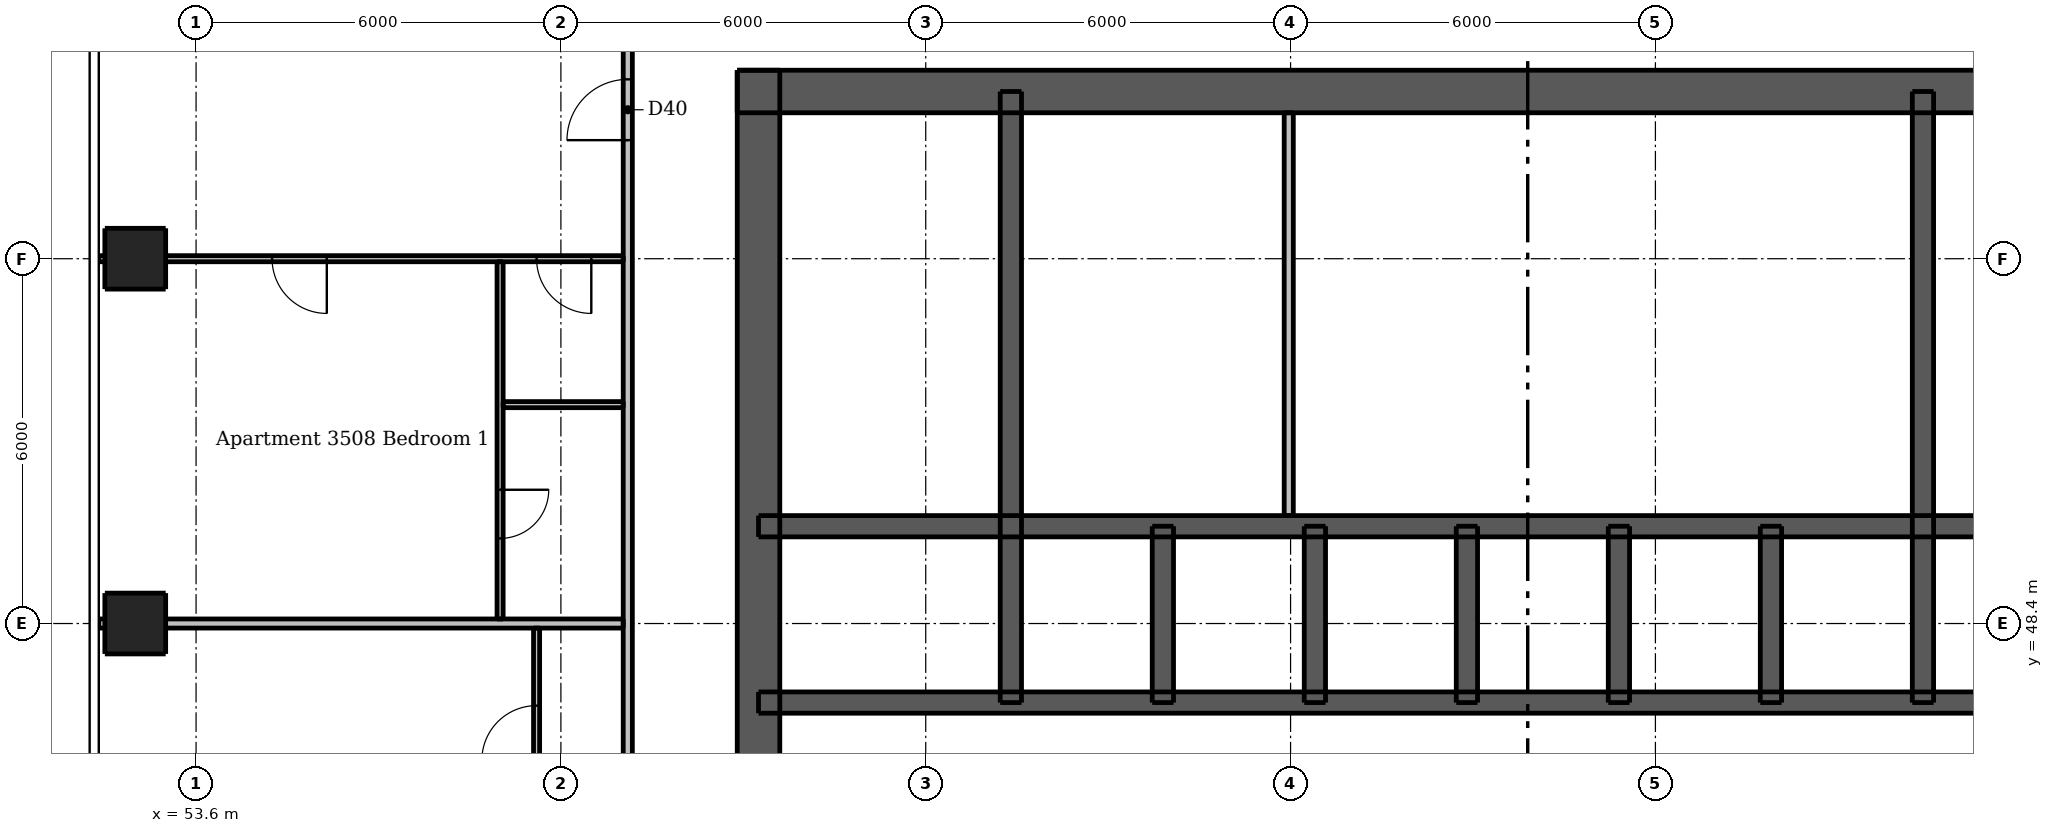
"""IFC4 building model, lengths in metres.
Left out: names, types, materials, properties, quantities, classifications, styles, units other than length and angle.
Written with IfcOpenShell. Run it as: python <this file> out.ifc"""

import sys

from ifc_helpers import new_model, si_unit, direction, frame, frame_2d, origin, origin_2d, place, context, subcontext, project, spatial, rectangle, extrude, element, fill, save


model = new_model("IFC4")
c1 = context("Model", 3, precision=1e-05, world=origin(), true_north=direction((0.0, 1.0)))
c2 = subcontext(c1, "Body", "Model", "MODEL_VIEW")
j1 = project(units=[si_unit("LENGTHUNIT", "METRE"), si_unit("PLANEANGLEUNIT", "RADIAN")], contexts=[c1])
p1 = place(None, origin())
s1 = spatial("IfcSite", under=j1, at=p1, CompositionType="ELEMENT")
p2 = place(p1, origin())
s2 = spatial("IfcBuilding", under=s1, at=p2, CompositionType="ELEMENT")
p3 = place(p2, frame((0.0, 0.0, 133.9)))
s3 = spatial("IfcBuildingStorey", under=s2, at=p3, CompositionType="ELEMENT", Elevation=133.9)
p4 = place(p3, frame((62.5, 57.15, 0.0), z_axis=(0.0, 0.0, 1.0), x_axis=(1.0, 0.0, 0.0)))
e1 = element("IfcWall", 1, at=p4, inside=s3, PredefinedType="SHEAR", context=c2, shape_type="SweptSolid", body=[
    extrude(rectangle(XDim=24.0, YDim=0.7, at=frame_2d((12.0, 0.0))), origin(), (0.0, 0.0, 1.0), 3.05),
])
p5 = place(p4, frame((20.938, 0.0, 0.0)))
e2 = element("IfcOpeningElement", 2, at=p5, cuts=e1, PredefinedType="OPENING", context=c2, shape_type="SweptSolid", body=[
    extrude(rectangle(XDim=1.1, YDim=2.1, at=frame_2d((0.55, 1.05))), frame((0.0, 0.36, 0.0), z_axis=(0.0, -1.0, 0.0), x_axis=(1.0, 0.0, 0.0)), (0.0, 0.0, 1.0), 0.72),
])
p6 = place(p4, frame((1.962, 0.0, 0.0)))
e3 = element("IfcOpeningElement", 3, at=p6, cuts=e1, PredefinedType="OPENING", context=c2, shape_type="SweptSolid", body=[
    extrude(rectangle(XDim=1.1, YDim=2.1, at=frame_2d((0.55, 1.05))), frame((0.0, 0.36, 0.0), z_axis=(0.0, -1.0, 0.0), x_axis=(1.0, 0.0, 0.0)), (0.0, 0.0, 1.0), 0.72),
])
p7 = place(p4, frame((6.423, 0.0, 0.0)))
e4 = element("IfcOpeningElement", 4, at=p7, cuts=e1, PredefinedType="OPENING", context=c2, shape_type="SweptSolid", body=[
    extrude(rectangle(XDim=0.9, YDim=2.1, at=frame_2d((0.45, 1.05))), frame((0.0, 0.36, 0.0), z_axis=(0.0, -1.0, 0.0), x_axis=(1.0, 0.0, 0.0)), (0.0, 0.0, 1.0), 0.72),
])
p8 = place(p4, frame((13.748, 0.0, 0.0)))
e5 = element("IfcOpeningElement", 5, at=p8, cuts=e1, PredefinedType="OPENING", context=c2, shape_type="SweptSolid", body=[
    extrude(rectangle(XDim=0.9, YDim=2.1, at=frame_2d((0.45, 1.05))), frame((0.0, 0.36, 0.0), z_axis=(0.0, -1.0, 0.0), x_axis=(1.0, 0.0, 0.0)), (0.0, 0.0, 1.0), 0.72),
])
p9 = place(p3, frame((62.85, 33.5, 0.0), z_axis=(0.0, 0.0, 1.0), x_axis=(0.0, 1.0, 0.0)))
e6 = element("IfcWall", 6, at=p9, inside=s3, PredefinedType="SHEAR", context=c2, shape_type="SweptSolid", body=[
    extrude(rectangle(XDim=24.0, YDim=0.7, at=frame_2d((12.0, 0.0))), origin(), (0.0, 0.0, 1.0), 3.05),
])
p10 = place(p9, frame((11.2, 0.0, 0.0)))
e7 = element("IfcOpeningElement", 7, at=p10, cuts=e6, PredefinedType="OPENING", context=c2, shape_type="SweptSolid", body=[
    extrude(rectangle(XDim=1.6, YDim=2.1, at=frame_2d((0.8, 1.05))), frame((0.0, 0.36, 0.0), z_axis=(0.0, -1.0, 0.0), x_axis=(1.0, 0.0, 0.0)), (0.0, 0.0, 1.0), 0.72),
])
p11 = place(p3, frame((62.85, 47.1, 0.0), z_axis=(0.0, 0.0, 1.0), x_axis=(1.0, 0.0, 0.0)))
e8 = element("IfcWall", 8, at=p11, inside=s3, PredefinedType="SHEAR", context=c2, shape_type="SweptSolid", body=[
    extrude(rectangle(XDim=23.3, YDim=0.35, at=frame_2d((11.65, 0.0))), origin(), (0.0, 0.0, 1.0), 3.05),
])
p12 = place(p11, frame((1.712, 0.0, 0.0)))
e9 = element("IfcOpeningElement", 9, at=p12, cuts=e8, PredefinedType="OPENING", context=c2, shape_type="SweptSolid", body=[
    extrude(rectangle(XDim=0.9, YDim=2.1, at=frame_2d((0.45, 1.05))), frame((0.0, 0.185, 0.0), z_axis=(0.0, -1.0, 0.0), x_axis=(1.0, 0.0, 0.0)), (0.0, 0.0, 1.0), 0.37),
])
p13 = place(p11, frame((20.688, 0.0, 0.0)))
e10 = element("IfcOpeningElement", 10, at=p13, cuts=e8, PredefinedType="OPENING", context=c2, shape_type="SweptSolid", body=[
    extrude(rectangle(XDim=0.9, YDim=2.1, at=frame_2d((0.45, 1.05))), frame((0.0, 0.185, 0.0), z_axis=(0.0, -1.0, 0.0), x_axis=(1.0, 0.0, 0.0)), (0.0, 0.0, 1.0), 0.37),
])
p14 = place(p3, frame((62.85, 50.0, 0.0), z_axis=(0.0, 0.0, 1.0), x_axis=(1.0, 0.0, 0.0)))
e11 = element("IfcWall", 11, at=p14, inside=s3, PredefinedType="SHEAR", context=c2, shape_type="SweptSolid", body=[
    extrude(rectangle(XDim=23.3, YDim=0.35, at=frame_2d((11.65, 0.0))), origin(), (0.0, 0.0, 1.0), 3.05),
])
for number, where, z_axis, x_axis in (
    (12, (67.0, 47.1, 0.0), (0.0, 0.0, 1.0), (0.0, 1.0, 0.0)),
    (13, (82.0, 47.1, 0.0), (0.0, 0.0, 1.0), (0.0, 1.0, 0.0)),
):
    element("IfcWall", number, at=place(p3, frame(where, z_axis=z_axis, x_axis=x_axis)), inside=s3, PredefinedType="SHEAR", context=c2, shape_type="SweptSolid", body=[
        extrude(rectangle(XDim=10.05, YDim=0.35, at=frame_2d((5.025, 0.0))), origin(), (0.0, 0.0, 1.0), 3.05),
    ])
for number, where, z_axis, x_axis in (
    (14, (69.5, 47.1, 0.0), (0.0, 0.0, 1.0), (0.0, 1.0, 0.0)),
    (15, (72.0, 47.1, 0.0), (0.0, 0.0, 1.0), (0.0, 1.0, 0.0)),
    (16, (74.5, 47.1, 0.0), (0.0, 0.0, 1.0), (0.0, 1.0, 0.0)),
    (17, (77.0, 47.1, 0.0), (0.0, 0.0, 1.0), (0.0, 1.0, 0.0)),
    (18, (79.5, 47.1, 0.0), (0.0, 0.0, 1.0), (0.0, 1.0, 0.0)),
):
    element("IfcWall", number, at=place(p3, frame(where, z_axis=z_axis, x_axis=x_axis)), inside=s3, PredefinedType="SHEAR", context=c2, shape_type="SweptSolid", body=[
        extrude(rectangle(XDim=2.9, YDim=0.35, at=frame_2d((1.45, 0.0))), origin(), (0.0, 0.0, 1.0), 3.05),
    ])
for number, where, z_axis, x_axis in (
    (19, (52.6, 48.4, 0.0), (0.0, 0.0, 1.0), (1.0, 0.0, 0.0)),
    (20, (52.6, 54.4, 0.0), (0.0, 0.0, 1.0), (1.0, 0.0, 0.0)),
):
    element("IfcColumn", number, at=place(p3, frame(where, z_axis=z_axis, x_axis=x_axis)), inside=s3, PredefinedType="COLUMN", context=c2, shape_type="SweptSolid", body=[
        extrude(rectangle(XDim=1.0, YDim=1.0, at=origin_2d()), origin(), (0.0, 0.0, 1.0), 3.05),
    ])
p15 = place(p3, frame((71.57, 50.175, 0.0), z_axis=(0.0, 0.0, 1.0), x_axis=(0.0, 1.0, 0.0)))
e21 = element("IfcWall", 21, at=p15, inside=s3, PredefinedType="PLUMBINGWALL", context=c2, shape_type="SweptSolid", body=[
    extrude(rectangle(XDim=6.625, YDim=0.15, at=frame_2d((3.312, 0.0))), origin(), (0.0, 0.0, 1.0), 3.05),
])
p16 = place(p3, frame((58.6, 54.35, 0.0), z_axis=(0.0, 0.0, 1.0), x_axis=(0.0, -1.0, 0.0)))
e22 = element("IfcWall", 22, at=p16, inside=s3, PredefinedType="PARTITIONING", context=c2, shape_type="SweptSolid", body=[
    extrude(rectangle(XDim=5.875, YDim=0.1, at=frame_2d((2.938, 0.0))), origin(), (0.0, 0.0, 1.0), 3.05),
])
p17 = place(p16, frame((3.75, 0.0, 0.0)))
e23 = element("IfcOpeningElement", 23, at=p17, cuts=e22, PredefinedType="OPENING", context=c2, shape_type="SweptSolid", body=[
    extrude(rectangle(XDim=0.8, YDim=2.1, at=frame_2d((0.4, 1.05))), frame((0.0, 0.06, 0.0), z_axis=(0.0, -1.0, 0.0), x_axis=(1.0, 0.0, 0.0)), (0.0, 0.0, 1.0), 0.12),
])
p18 = place(p3, frame((59.2, 31.65, 0.0), z_axis=(0.0, 0.0, 1.0), x_axis=(0.0, 1.0, 0.0)))
e24 = element("IfcWall", 24, at=p18, inside=s3, PredefinedType="PARTITIONING", context=c2, shape_type="SweptSolid", body=[
    extrude(rectangle(XDim=16.675, YDim=0.1, at=frame_2d((8.337, 0.0))), origin(), (0.0, 0.0, 1.0), 3.05),
])
p19 = place(p18, frame((0.75, 0.0, 0.0)))
e25 = element("IfcOpeningElement", 25, at=p19, cuts=e24, PredefinedType="OPENING", context=c2, shape_type="SweptSolid", body=[
    extrude(rectangle(XDim=0.9, YDim=2.1, at=frame_2d((0.45, 1.05))), frame((0.0, 0.06, 0.0), z_axis=(0.0, -1.0, 0.0), x_axis=(1.0, 0.0, 0.0)), (0.0, 0.0, 1.0), 0.12),
])
p20 = place(p18, frame((3.1, 0.0, 0.0)))
e26 = element("IfcOpeningElement", 26, at=p20, cuts=e24, PredefinedType="OPENING", context=c2, shape_type="SweptSolid", body=[
    extrude(rectangle(XDim=0.9, YDim=2.1, at=frame_2d((0.45, 1.05))), frame((0.0, 0.06, 0.0), z_axis=(0.0, -1.0, 0.0), x_axis=(1.0, 0.0, 0.0)), (0.0, 0.0, 1.0), 0.12),
])
p21 = place(p18, frame((8.5, 0.0, 0.0)))
e27 = element("IfcOpeningElement", 27, at=p21, cuts=e24, PredefinedType="OPENING", context=c2, shape_type="SweptSolid", body=[
    extrude(rectangle(XDim=0.9, YDim=2.1, at=frame_2d((0.45, 1.05))), frame((0.0, 0.06, 0.0), z_axis=(0.0, -1.0, 0.0), x_axis=(1.0, 0.0, 0.0)), (0.0, 0.0, 1.0), 0.12),
])
p22 = place(p18, frame((14.5, 0.0, 0.0)))
e28 = element("IfcOpeningElement", 28, at=p22, cuts=e24, PredefinedType="OPENING", context=c2, shape_type="SweptSolid", body=[
    extrude(rectangle(XDim=0.9, YDim=2.1, at=frame_2d((0.45, 1.05))), frame((0.0, 0.06, 0.0), z_axis=(0.0, -1.0, 0.0), x_axis=(1.0, 0.0, 0.0)), (0.0, 0.0, 1.0), 0.12),
])
p23 = place(p18, frame((5.55, 0.0, 0.0)))
e29 = element("IfcOpeningElement", 29, at=p23, cuts=e24, PredefinedType="OPENING", context=c2, shape_type="SweptSolid", body=[
    extrude(rectangle(XDim=0.8, YDim=2.1, at=frame_2d((0.4, 1.05))), frame((0.0, 0.06, 0.0), z_axis=(0.0, -1.0, 0.0), x_axis=(1.0, 0.0, 0.0)), (0.0, 0.0, 1.0), 0.12),
])
p24 = place(p18, frame((11.55, 0.0, 0.0)))
e30 = element("IfcOpeningElement", 30, at=p24, cuts=e24, PredefinedType="OPENING", context=c2, shape_type="SweptSolid", body=[
    extrude(rectangle(XDim=0.8, YDim=2.1, at=frame_2d((0.4, 1.05))), frame((0.0, 0.06, 0.0), z_axis=(0.0, -1.0, 0.0), x_axis=(1.0, 0.0, 0.0)), (0.0, 0.0, 1.0), 0.12),
])
p25 = place(p3, frame((60.625, 54.4, 0.0), z_axis=(0.0, 0.0, 1.0), x_axis=(-1.0, 0.0, 0.0)))
e31 = element("IfcWall", 31, at=p25, inside=s3, PredefinedType="PARTITIONING", context=c2, shape_type="SweptSolid", body=[
    extrude(rectangle(XDim=8.625, YDim=0.1, at=frame_2d((4.312, 0.0))), origin(), (0.0, 0.0, 1.0), 2.516),
])
p26 = place(p25, frame((0.525, 0.0, 0.0)))
e32 = element("IfcOpeningElement", 32, at=p26, cuts=e31, PredefinedType="OPENING", context=c2, shape_type="SweptSolid", body=[
    extrude(rectangle(XDim=0.9, YDim=2.1, at=frame_2d((0.45, 1.05))), frame((0.0, 0.06, 0.0), z_axis=(0.0, -1.0, 0.0), x_axis=(1.0, 0.0, 0.0)), (0.0, 0.0, 1.0), 0.12),
])
p27 = place(p25, frame((4.875, 0.0, 0.0)))
e33 = element("IfcOpeningElement", 33, at=p27, cuts=e31, PredefinedType="OPENING", context=c2, shape_type="SweptSolid", body=[
    extrude(rectangle(XDim=0.9, YDim=2.1, at=frame_2d((0.45, 1.05))), frame((0.0, 0.06, 0.0), z_axis=(0.0, -1.0, 0.0), x_axis=(1.0, 0.0, 0.0)), (0.0, 0.0, 1.0), 0.12),
])
p28 = place(p3, frame((58.65, 52.0, 0.0), z_axis=(0.0, 0.0, 1.0), x_axis=(1.0, 0.0, 0.0)))
e34 = element("IfcWall", 34, at=p28, inside=s3, PredefinedType="PARTITIONING", context=c2, shape_type="SweptSolid", body=[
    extrude(rectangle(XDim=1.975, YDim=0.1, at=frame_2d((0.988, 0.0))), origin(), (0.0, 0.0, 1.0), 3.05),
])
p29 = place(p3, frame((60.7, 30.325, 0.0), z_axis=(0.0, 0.0, 1.0), x_axis=(0.0, 1.0, 0.0)))
e35 = element("IfcWall", 35, at=p29, inside=s3, PredefinedType="PARTITIONING", context=c2, shape_type="SweptSolid", body=[
    extrude(rectangle(XDim=28.9, YDim=0.15, at=frame_2d((14.45, 0.0))), origin(), (0.0, 0.0, 1.0), 3.05),
])
p30 = place(p29, frame((9.225, 0.0, 0.0)))
e36 = element("IfcOpeningElement", 36, at=p30, cuts=e35, PredefinedType="OPENING", context=c2, shape_type="SweptSolid", body=[
    extrude(rectangle(XDim=1.0, YDim=2.1, at=frame_2d((0.5, 1.05))), frame((0.0, 0.085, 0.0), z_axis=(0.0, -1.0, 0.0), x_axis=(1.0, 0.0, 0.0)), (0.0, 0.0, 1.0), 0.17),
])
p31 = place(p29, frame((26.025, 0.0, 0.0)))
e37 = element("IfcOpeningElement", 37, at=p31, cuts=e35, PredefinedType="OPENING", context=c2, shape_type="SweptSolid", body=[
    extrude(rectangle(XDim=1.0, YDim=2.1, at=frame_2d((0.5, 1.05))), frame((0.0, 0.085, 0.0), z_axis=(0.0, -1.0, 0.0), x_axis=(1.0, 0.0, 0.0)), (0.0, 0.0, 1.0), 0.17),
])
p32 = place(p3, frame((52.0, 48.4, 0.0), z_axis=(0.0, 0.0, 1.0), x_axis=(1.0, 0.0, 0.0)))
e38 = element("IfcWall", 38, at=p32, inside=s3, PredefinedType="PARTITIONING", context=c2, shape_type="SweptSolid", body=[
    extrude(rectangle(XDim=8.625, YDim=0.15, at=frame_2d((4.312, 0.0))), origin(), (0.0, 0.0, 1.0), 2.516),
])
p33 = place(p6, origin())
e39 = element("IfcDoor", 39, at=p33, inside=s3, OperationType="SINGLE_SWING_LEFT", PredefinedType="DOOR", context=c2, shape_type="SweptSolid", body=[
    extrude(rectangle(XDim=1.1, YDim=2.1, at=frame_2d((0.55, 1.05))), frame((0.0, -0.288, 0.0), z_axis=(0.0, -1.0, 0.0), x_axis=(1.0, 0.0, 0.0)), (0.0, 0.0, 1.0), 0.05),
])
fill(e3, e39)
p34 = place(p10, origin())
e40 = element("IfcDoor", 40, at=p34, inside=s3, OperationType="DOUBLE_DOOR_SINGLE_SWING", PredefinedType="DOOR", context=c2, shape_type="SweptSolid", body=[
    extrude(rectangle(XDim=1.6, YDim=2.1, at=frame_2d((0.8, 1.05))), frame((0.0, -0.288, 0.0), z_axis=(0.0, -1.0, 0.0), x_axis=(1.0, 0.0, 0.0)), (0.0, 0.0, 1.0), 0.05),
])
fill(e7, e40)
p35 = place(p12, origin())
e41 = element("IfcDoor", 41, at=p35, inside=s3, OperationType="SINGLE_SWING_LEFT", PredefinedType="DOOR", context=c2, shape_type="SweptSolid", body=[
    extrude(rectangle(XDim=0.9, YDim=2.1, at=frame_2d((0.45, 1.05))), frame((0.0, 0.163, 0.0), z_axis=(0.0, -1.0, 0.0), x_axis=(1.0, 0.0, 0.0)), (0.0, 0.0, 1.0), 0.05),
])
fill(e9, e41)
p36 = place(p7, origin())
e42 = element("IfcDoor", 42, at=p36, inside=s3, OperationType="SINGLE_SWING_RIGHT", PredefinedType="DOOR", context=c2, shape_type="SweptSolid", body=[
    extrude(rectangle(XDim=0.9, YDim=2.1, at=frame_2d((0.45, 1.05))), frame((0.0, -0.288, 0.0), z_axis=(0.0, -1.0, 0.0), x_axis=(1.0, 0.0, 0.0)), (0.0, 0.0, 1.0), 0.05),
])
fill(e4, e42)
p37 = place(p8, origin())
e43 = element("IfcDoor", 43, at=p37, inside=s3, OperationType="SINGLE_SWING_RIGHT", PredefinedType="DOOR", context=c2, shape_type="SweptSolid", body=[
    extrude(rectangle(XDim=0.9, YDim=2.1, at=frame_2d((0.45, 1.05))), frame((0.0, -0.288, 0.0), z_axis=(0.0, -1.0, 0.0), x_axis=(1.0, 0.0, 0.0)), (0.0, 0.0, 1.0), 0.05),
])
fill(e5, e43)
p38 = place(p22, origin())
e44 = element("IfcDoor", 44, at=p38, inside=s3, OperationType="SINGLE_SWING_LEFT", PredefinedType="DOOR", context=c2, shape_type="SweptSolid", body=[
    extrude(rectangle(XDim=0.9, YDim=2.1, at=frame_2d((0.45, 1.05))), frame((0.0, 0.025, 0.0), z_axis=(0.0, -1.0, 0.0), x_axis=(1.0, 0.0, 0.0)), (0.0, 0.0, 1.0), 0.05),
])
fill(e28, e44)
p39 = place(p31, origin())
e45 = element("IfcDoor", 45, at=p39, inside=s3, OperationType="SINGLE_SWING_LEFT", PredefinedType="DOOR", context=c2, shape_type="SweptSolid", body=[
    extrude(rectangle(XDim=1.0, YDim=2.1, at=frame_2d((0.5, 1.05))), frame((0.0, 0.025, 0.0), z_axis=(0.0, -1.0, 0.0), x_axis=(1.0, 0.0, 0.0)), (0.0, 0.0, 1.0), 0.05),
])
fill(e37, e45)
p40 = place(p26, origin())
e46 = element("IfcDoor", 46, at=p40, inside=s3, OperationType="SINGLE_SWING_LEFT", PredefinedType="DOOR", context=c2, shape_type="SweptSolid", body=[
    extrude(rectangle(XDim=0.9, YDim=2.1, at=frame_2d((0.45, 1.05))), frame((0.0, 0.025, 0.0), z_axis=(0.0, -1.0, 0.0), x_axis=(1.0, 0.0, 0.0)), (0.0, 0.0, 1.0), 0.05),
])
fill(e32, e46)
p41 = place(p27, origin())
e47 = element("IfcDoor", 47, at=p41, inside=s3, OperationType="SINGLE_SWING_LEFT", PredefinedType="DOOR", context=c2, shape_type="SweptSolid", body=[
    extrude(rectangle(XDim=0.9, YDim=2.1, at=frame_2d((0.45, 1.05))), frame((0.0, 0.025, 0.0), z_axis=(0.0, -1.0, 0.0), x_axis=(1.0, 0.0, 0.0)), (0.0, 0.0, 1.0), 0.05),
])
fill(e33, e47)
p42 = place(p17, origin())
e48 = element("IfcDoor", 48, at=p42, inside=s3, OperationType="SINGLE_SWING_LEFT", PredefinedType="DOOR", context=c2, shape_type="SweptSolid", body=[
    extrude(rectangle(XDim=0.8, YDim=2.1, at=frame_2d((0.4, 1.05))), frame((0.0, 0.025, 0.0), z_axis=(0.0, -1.0, 0.0), x_axis=(1.0, 0.0, 0.0)), (0.0, 0.0, 1.0), 0.05),
])
fill(e23, e48)
save(model, sys.argv[1])
